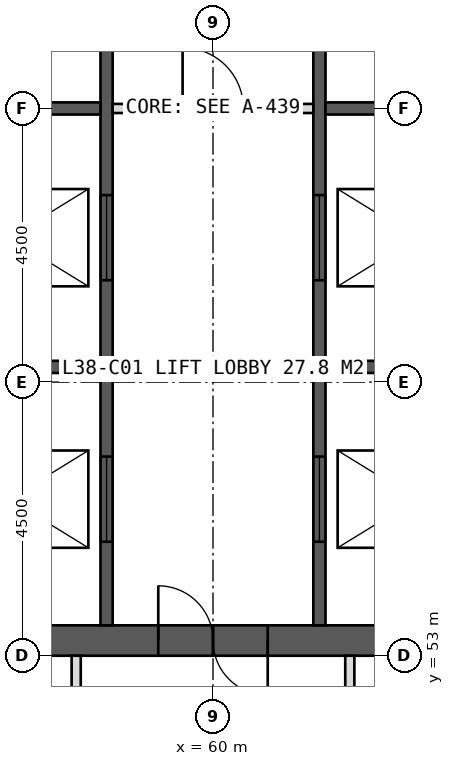
"""IFC4 building model, lengths in metres.
Left out: names, types, materials, properties, quantities, classifications, styles, units other than length and angle.
Written with IfcOpenShell. Run it as: python <this file> out.ifc"""

import sys

from ifc_helpers import new_model, si_unit, direction, frame, frame_2d, origin, place, context, subcontext, project, spatial, rectangle, extrude, element, fill, save


model = new_model("IFC4")
c1 = context("Model", 3, precision=1e-05, world=origin(), true_north=direction((0.0, 1.0)))
c2 = subcontext(c1, "Body", "Model", "MODEL_VIEW")
j1 = project(units=[si_unit("LENGTHUNIT", "METRE"), si_unit("PLANEANGLEUNIT", "RADIAN")], contexts=[c1])
p1 = place(None, origin())
s1 = spatial("IfcSite", under=j1, at=p1, CompositionType="ELEMENT")
p2 = place(p1, origin())
s2 = spatial("IfcBuilding", under=s1, at=p2, CompositionType="ELEMENT")
p3 = place(p2, frame((0.0, 0.0, 160.0)))
s3 = spatial("IfcBuildingStorey", under=s2, at=p3, CompositionType="ELEMENT", Elevation=160.0)
p4 = place(p3, frame((51.0, 53.25, 0.0), z_axis=(0.0, 0.0, 1.0), x_axis=(1.0, 0.0, 0.0)))
e1 = element("IfcWall", 1, at=p4, inside=s3, PredefinedType="SHEAR", context=c2, shape_type="SweptSolid", body=[
    extrude(rectangle(XDim=18.0, YDim=0.5, at=frame_2d((9.0, 0.0))), origin(), (0.0, 0.0, 1.0), 4.0),
])
p5 = place(p4, frame((8.1, 0.0, 0.0)))
e2 = element("IfcOpeningElement", 2, at=p5, cuts=e1, PredefinedType="OPENING", context=c2, shape_type="SweptSolid", body=[
    extrude(rectangle(XDim=1.8, YDim=2.2, at=frame_2d((0.9, 1.1))), frame((0.0, 0.26, 0.0), z_axis=(0.0, -1.0, 0.0), x_axis=(1.0, 0.0, 0.0)), (0.0, 0.0, 1.0), 0.52),
])
p6 = place(p3, frame((58.25, 53.5, 0.0), z_axis=(0.0, 0.0, 1.0), x_axis=(0.0, 1.0, 0.0)))
e3 = element("IfcWall", 3, at=p6, inside=s3, PredefinedType="SHEAR", context=c2, shape_type="SweptSolid", body=[
    extrude(rectangle(XDim=17.0, YDim=0.2, at=frame_2d((8.5, 0.0))), origin(), (0.0, 0.0, 1.0), 4.0),
])
p7 = place(p6, frame((1.375, 0.0, 0.0)))
e4 = element("IfcOpeningElement", 4, at=p7, cuts=e3, PredefinedType="OPENING", context=c2, shape_type="SweptSolid", body=[
    extrude(rectangle(XDim=1.4, YDim=2.2, at=frame_2d((0.7, 1.1))), frame((0.0, 0.11, 0.0), z_axis=(0.0, -1.0, 0.0), x_axis=(1.0, 0.0, 0.0)), (0.0, 0.0, 1.0), 0.22),
])
p8 = place(p6, frame((5.675, 0.0, 0.0)))
e5 = element("IfcOpeningElement", 5, at=p8, cuts=e3, PredefinedType="OPENING", context=c2, shape_type="SweptSolid", body=[
    extrude(rectangle(XDim=1.4, YDim=2.2, at=frame_2d((0.7, 1.1))), frame((0.0, 0.11, 0.0), z_axis=(0.0, -1.0, 0.0), x_axis=(1.0, 0.0, 0.0)), (0.0, 0.0, 1.0), 0.22),
])
p9 = place(p3, frame((61.75, 53.5, 0.0), z_axis=(0.0, 0.0, 1.0), x_axis=(0.0, 1.0, 0.0)))
e6 = element("IfcWall", 6, at=p9, inside=s3, PredefinedType="SHEAR", context=c2, shape_type="SweptSolid", body=[
    extrude(rectangle(XDim=17.0, YDim=0.2, at=frame_2d((8.5, 0.0))), origin(), (0.0, 0.0, 1.0), 4.0),
])
p10 = place(p9, frame((1.375, 0.0, 0.0)))
e7 = element("IfcOpeningElement", 7, at=p10, cuts=e6, PredefinedType="OPENING", context=c2, shape_type="SweptSolid", body=[
    extrude(rectangle(XDim=1.4, YDim=2.2, at=frame_2d((0.7, 1.1))), frame((0.0, 0.11, 0.0), z_axis=(0.0, -1.0, 0.0), x_axis=(1.0, 0.0, 0.0)), (0.0, 0.0, 1.0), 0.22),
])
p11 = place(p9, frame((5.675, 0.0, 0.0)))
e8 = element("IfcOpeningElement", 8, at=p11, cuts=e6, PredefinedType="OPENING", context=c2, shape_type="SweptSolid", body=[
    extrude(rectangle(XDim=1.4, YDim=2.2, at=frame_2d((0.7, 1.1))), frame((0.0, 0.11, 0.0), z_axis=(0.0, -1.0, 0.0), x_axis=(1.0, 0.0, 0.0)), (0.0, 0.0, 1.0), 0.22),
])
for number, where, z_axis, x_axis in (
    (9, (55.1, 57.75, 0.0), (0.0, 0.0, 1.0), (1.0, 0.0, 0.0)),
    (10, (61.85, 57.75, 0.0), (0.0, 0.0, 1.0), (1.0, 0.0, 0.0)),
    (11, (55.1, 62.0, 0.0), (0.0, 0.0, 1.0), (1.0, 0.0, 0.0)),
    (12, (61.85, 62.0, 0.0), (0.0, 0.0, 1.0), (1.0, 0.0, 0.0)),
):
    element("IfcWall", number, at=place(p3, frame(where, z_axis=z_axis, x_axis=x_axis)), inside=s3, PredefinedType="SHEAR", context=c2, shape_type="SweptSolid", body=[
        extrude(rectangle(XDim=3.05, YDim=0.2, at=frame_2d((1.525, 0.0))), origin(), (0.0, 0.0, 1.0), 4.0),
    ])
for number, where, z_axis, x_axis in (
    (13, (62.25, 53.0, 0.0), (0.0, 0.0, 1.0), (0.0, -1.0, 0.0)),
    (14, (57.75, 53.0, 0.0), (0.0, 0.0, 1.0), (0.0, -1.0, 0.0)),
):
    element("IfcWall", number, at=place(p3, frame(where, z_axis=z_axis, x_axis=x_axis)), inside=s3, PredefinedType="PARTITIONING", context=c2, shape_type="SweptSolid", body=[
        extrude(rectangle(XDim=6.3, YDim=0.15, at=frame_2d((3.15, 0.0))), origin(), (0.0, 0.0, 1.0), 3.75),
    ])
p12 = place(p3, frame((58.35, 62.0, 0.0), z_axis=(0.0, 0.0, 1.0), x_axis=(1.0, 0.0, 0.0)))
e15 = element("IfcWall", 15, at=p12, inside=s3, PredefinedType="PARTITIONING", context=c2, shape_type="SweptSolid", body=[
    extrude(rectangle(XDim=3.3, YDim=0.15, at=frame_2d((1.65, 0.0))), origin(), (0.0, 0.0, 1.0), 3.75),
])
p13 = place(p12, frame((1.15, 0.0, 0.0)))
e16 = element("IfcOpeningElement", 16, at=p13, cuts=e15, PredefinedType="OPENING", context=c2, shape_type="SweptSolid", body=[
    extrude(rectangle(XDim=1.0, YDim=2.1, at=frame_2d((0.5, 1.05))), frame((0.0, 0.085, 0.0), z_axis=(0.0, -1.0, 0.0), x_axis=(1.0, 0.0, 0.0)), (0.0, 0.0, 1.0), 0.17),
])
p14 = place(p5, origin())
e17 = element("IfcDoor", 17, at=p14, inside=s3, OperationType="DOUBLE_DOOR_SINGLE_SWING", PredefinedType="DOOR", context=c2, shape_type="SweptSolid", body=[
    extrude(rectangle(XDim=1.8, YDim=2.2, at=frame_2d((0.9, 1.1))), frame((0.0, 0.025, 0.0), z_axis=(0.0, -1.0, 0.0), x_axis=(1.0, 0.0, 0.0)), (0.0, 0.0, 1.0), 0.05),
])
fill(e2, e17)
p15 = place(p7, origin())
e18 = element("IfcDoor", 18, at=p15, inside=s3, OperationType="SLIDING_TO_LEFT", PredefinedType="DOOR", context=c2, shape_type="SweptSolid", body=[
    extrude(rectangle(XDim=1.4, YDim=2.2, at=frame_2d((0.7, 1.1))), frame((0.0, 0.025, 0.0), z_axis=(0.0, -1.0, 0.0), x_axis=(1.0, 0.0, 0.0)), (0.0, 0.0, 1.0), 0.05),
])
fill(e4, e18)
p16 = place(p10, origin())
e19 = element("IfcDoor", 19, at=p16, inside=s3, OperationType="SLIDING_TO_LEFT", PredefinedType="DOOR", context=c2, shape_type="SweptSolid", body=[
    extrude(rectangle(XDim=1.4, YDim=2.2, at=frame_2d((0.7, 1.1))), frame((0.0, 0.025, 0.0), z_axis=(0.0, -1.0, 0.0), x_axis=(1.0, 0.0, 0.0)), (0.0, 0.0, 1.0), 0.05),
])
fill(e7, e19)
p17 = place(p8, origin())
e20 = element("IfcDoor", 20, at=p17, inside=s3, OperationType="SLIDING_TO_LEFT", PredefinedType="DOOR", context=c2, shape_type="SweptSolid", body=[
    extrude(rectangle(XDim=1.4, YDim=2.2, at=frame_2d((0.7, 1.1))), frame((0.0, 0.025, 0.0), z_axis=(0.0, -1.0, 0.0), x_axis=(1.0, 0.0, 0.0)), (0.0, 0.0, 1.0), 0.05),
])
fill(e5, e20)
p18 = place(p11, origin())
e21 = element("IfcDoor", 21, at=p18, inside=s3, OperationType="SLIDING_TO_LEFT", PredefinedType="DOOR", context=c2, shape_type="SweptSolid", body=[
    extrude(rectangle(XDim=1.4, YDim=2.2, at=frame_2d((0.7, 1.1))), frame((0.0, 0.025, 0.0), z_axis=(0.0, -1.0, 0.0), x_axis=(1.0, 0.0, 0.0)), (0.0, 0.0, 1.0), 0.05),
])
fill(e8, e21)
p19 = place(p13, origin())
e22 = element("IfcDoor", 22, at=p19, inside=s3, OperationType="SINGLE_SWING_LEFT", PredefinedType="DOOR", context=c2, shape_type="SweptSolid", body=[
    extrude(rectangle(XDim=1.0, YDim=2.1, at=frame_2d((0.5, 1.05))), frame((0.0, 0.025, 0.0), z_axis=(0.0, -1.0, 0.0), x_axis=(1.0, 0.0, 0.0)), (0.0, 0.0, 1.0), 0.05),
])
fill(e16, e22)
save(model, sys.argv[1])
